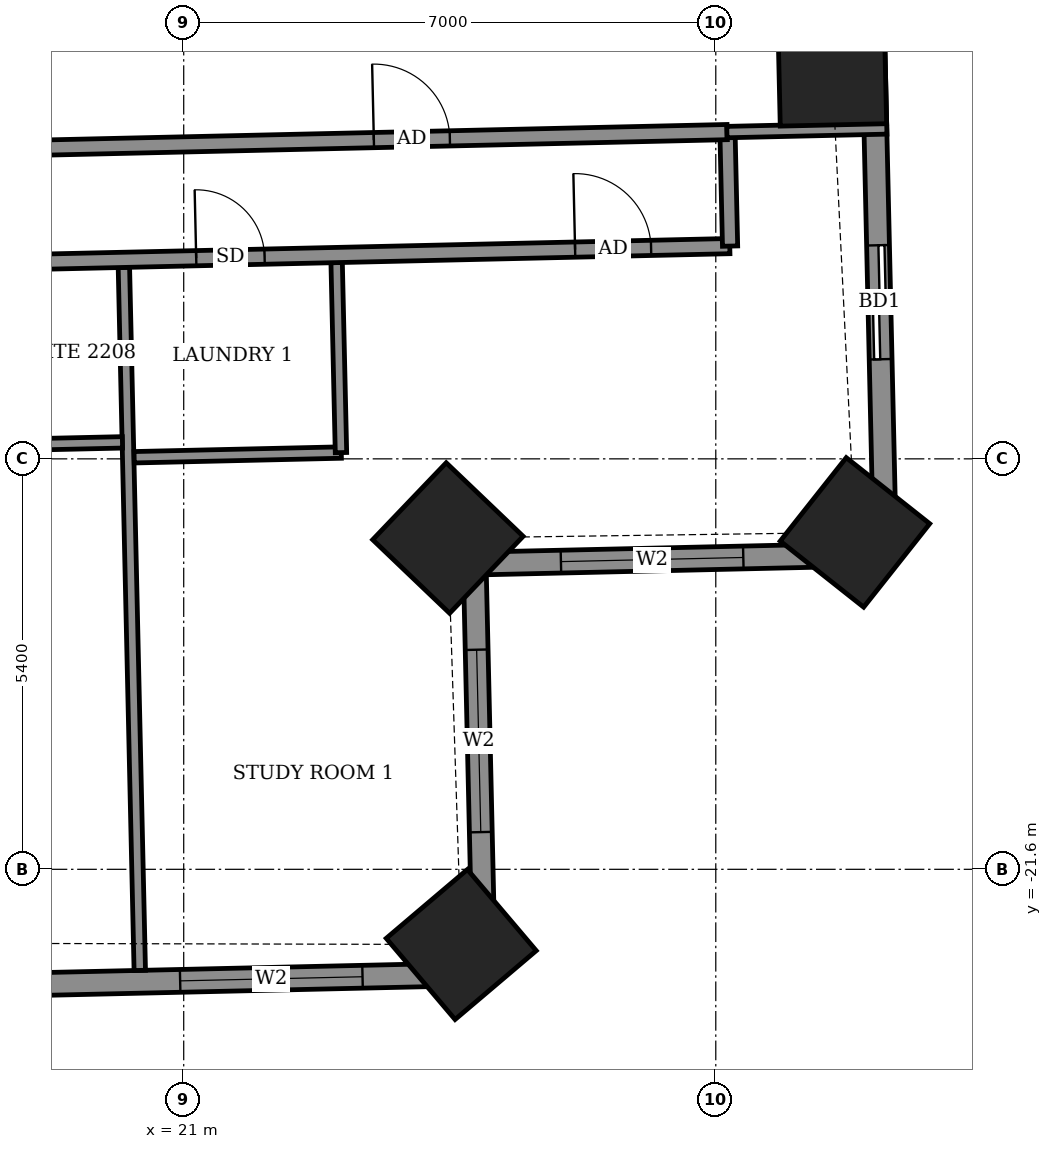
"""IFC4 building model, lengths in metres.
Left out: names, types, materials, properties, quantities, classifications, styles, units other than length and angle.
Written with IfcOpenShell. Run it as: python <this file> out.ifc"""

import sys

from ifc_helpers import new_model, si_unit, direction, frame, frame_2d, origin, origin_2d, place, context, subcontext, project, spatial, rectangle, extrude, element, fill, save


model = new_model("IFC4")
c1 = context("Model", 3, precision=1e-05, world=origin(), true_north=direction((0.0, 1.0)))
c2 = subcontext(c1, "Body", "Model", "MODEL_VIEW")
j1 = project(units=[si_unit("LENGTHUNIT", "METRE"), si_unit("PLANEANGLEUNIT", "RADIAN")], contexts=[c1])
p1 = place(None, origin())
s1 = spatial("IfcSite", under=j1, at=p1, CompositionType="ELEMENT")
p2 = place(p1, origin())
s2 = spatial("IfcBuilding", under=s1, at=p2, CompositionType="ELEMENT")
p3 = place(p2, frame((0.0, 0.0, 90.1)))
s3 = spatial("IfcBuildingStorey", under=s2, at=p3, CompositionType="ELEMENT", Elevation=90.1)
for number, where, z_axis, x_axis in (
    (1, (24.651, -22.589, -0.55), (0.0, 0.0, 1.0), (0.763, 0.647, 0.0)),
    (2, (24.476, -17.241, -0.55), (0.0, 0.0, 1.0), (0.691, 0.723, 0.0)),
    (3, (29.831, -17.168, -0.55), (0.0, 0.0, 1.0), (0.621, 0.784, 0.0)),
    (4, (29.532, -11.107, -0.55), (0.0, 0.0, 1.0), (-0.023, 1.0, 0.0)),
):
    element("IfcColumn", number, at=place(p3, frame(where, z_axis=z_axis, x_axis=x_axis)), inside=s3, PredefinedType="COLUMN", context=c2, shape_type="SweptSolid", body=[
        extrude(rectangle(XDim=1.4, YDim=1.4, at=origin_2d()), origin(), (0.0, 0.0, 1.0), 3.6),
    ])
p4 = place(p3, frame((30.227, -17.455, 0.0), z_axis=(0.0, 0.0, 1.0), x_axis=(-0.022734702163, 0.999741533256, 0.0)))
e5 = element("IfcWall", 5, at=p4, inside=s3, PredefinedType="SOLIDWALL", context=c2, shape_type="SweptSolid", body=[
    extrude(rectangle(XDim=12.929, YDim=0.3, at=frame_2d((6.465, 0.0))), origin(), (0.0, 0.0, 1.0), 3.05),
])
p5 = place(p4, frame((2.566, 0.0, 0.0)))
e6 = element("IfcOpeningElement", 6, at=p5, cuts=e5, PredefinedType="OPENING", context=c2, shape_type="SweptSolid", body=[
    extrude(rectangle(XDim=1.5, YDim=2.4, at=frame_2d((0.75, 1.2))), frame((0.0, 0.16, 0.0), z_axis=(0.0, -1.0, 0.0), x_axis=(1.0, 0.0, 0.0)), (0.0, 0.0, 1.0), 0.32),
])
p6 = place(p4, frame((7.646, 0.0, 0.9)))
e7 = element("IfcOpeningElement", 7, at=p6, cuts=e5, PredefinedType="OPENING", context=c2, shape_type="SweptSolid", body=[
    extrude(rectangle(XDim=1.2, YDim=1.5, at=frame_2d((0.6, 0.75))), frame((0.0, 0.16, 0.0), z_axis=(0.0, -1.0, 0.0), x_axis=(1.0, 0.0, 0.0)), (0.0, 0.0, 1.0), 0.32),
])
p7 = place(p3, frame((-21.409, -24.029, 0.0), z_axis=(0.0, 0.0, 1.0), x_axis=(0.999742634032, 0.022686244721, 0.0)))
e8 = element("IfcWall", 8, at=p7, inside=s3, PredefinedType="SOLIDWALL", context=c2, shape_type="SweptSolid", body=[
    extrude(rectangle(XDim=46.372, YDim=0.3, at=frame_2d((23.186, 0.0))), origin(), (0.0, 0.0, 1.0), 3.05),
])
p8 = place(p7, frame((2.686, 0.0, 0.0)))
e9 = element("IfcOpeningElement", 9, at=p8, cuts=e8, PredefinedType="OPENING", context=c2, shape_type="SweptSolid", body=[
    extrude(rectangle(XDim=1.5, YDim=2.4, at=frame_2d((0.75, 1.2))), frame((0.0, 0.16, 0.0), z_axis=(0.0, -1.0, 0.0), x_axis=(1.0, 0.0, 0.0)), (0.0, 0.0, 1.0), 0.32),
])
p9 = place(p7, frame((7.959, 0.0, 0.0)))
e10 = element("IfcOpeningElement", 10, at=p9, cuts=e8, PredefinedType="OPENING", context=c2, shape_type="SweptSolid", body=[
    extrude(rectangle(XDim=1.5, YDim=2.4, at=frame_2d((0.75, 1.2))), frame((0.0, 0.16, 0.0), z_axis=(0.0, -1.0, 0.0), x_axis=(1.0, 0.0, 0.0)), (0.0, 0.0, 1.0), 0.32),
])
p10 = place(p7, frame((10.842, 0.0, 0.0)))
e11 = element("IfcOpeningElement", 11, at=p10, cuts=e8, PredefinedType="OPENING", context=c2, shape_type="SweptSolid", body=[
    extrude(rectangle(XDim=1.5, YDim=2.4, at=frame_2d((0.75, 1.2))), frame((0.0, 0.16, 0.0), z_axis=(0.0, -1.0, 0.0), x_axis=(1.0, 0.0, 0.0)), (0.0, 0.0, 1.0), 0.32),
])
p11 = place(p7, frame((16.3, 0.0, 0.0)))
e12 = element("IfcOpeningElement", 12, at=p11, cuts=e8, PredefinedType="OPENING", context=c2, shape_type="SweptSolid", body=[
    extrude(rectangle(XDim=1.5, YDim=2.4, at=frame_2d((0.75, 1.2))), frame((0.0, 0.16, 0.0), z_axis=(0.0, -1.0, 0.0), x_axis=(1.0, 0.0, 0.0)), (0.0, 0.0, 1.0), 0.32),
])
p12 = place(p7, frame((21.326, 0.0, 0.0)))
e13 = element("IfcOpeningElement", 13, at=p12, cuts=e8, PredefinedType="OPENING", context=c2, shape_type="SweptSolid", body=[
    extrude(rectangle(XDim=1.5, YDim=2.4, at=frame_2d((0.75, 1.2))), frame((0.0, 0.16, 0.0), z_axis=(0.0, -1.0, 0.0), x_axis=(1.0, 0.0, 0.0)), (0.0, 0.0, 1.0), 0.32),
])
p13 = place(p7, frame((24.21, 0.0, 0.0)))
e14 = element("IfcOpeningElement", 14, at=p13, cuts=e8, PredefinedType="OPENING", context=c2, shape_type="SweptSolid", body=[
    extrude(rectangle(XDim=1.5, YDim=2.4, at=frame_2d((0.75, 1.2))), frame((0.0, 0.16, 0.0), z_axis=(0.0, -1.0, 0.0), x_axis=(1.0, 0.0, 0.0)), (0.0, 0.0, 1.0), 0.32),
])
p14 = place(p7, frame((29.769, 0.0, 0.0)))
e15 = element("IfcOpeningElement", 15, at=p14, cuts=e8, PredefinedType="OPENING", context=c2, shape_type="SweptSolid", body=[
    extrude(rectangle(XDim=1.5, YDim=2.4, at=frame_2d((0.75, 1.2))), frame((0.0, 0.16, 0.0), z_axis=(0.0, -1.0, 0.0), x_axis=(1.0, 0.0, 0.0)), (0.0, 0.0, 1.0), 0.32),
])
p15 = place(p7, frame((34.819, 0.0, 0.0)))
e16 = element("IfcOpeningElement", 16, at=p15, cuts=e8, PredefinedType="OPENING", context=c2, shape_type="SweptSolid", body=[
    extrude(rectangle(XDim=1.5, YDim=2.4, at=frame_2d((0.75, 1.2))), frame((0.0, 0.16, 0.0), z_axis=(0.0, -1.0, 0.0), x_axis=(1.0, 0.0, 0.0)), (0.0, 0.0, 1.0), 0.32),
])
p16 = place(p7, frame((37.852, 0.0, 0.0)))
e17 = element("IfcOpeningElement", 17, at=p16, cuts=e8, PredefinedType="OPENING", context=c2, shape_type="SweptSolid", body=[
    extrude(rectangle(XDim=1.2, YDim=2.4, at=frame_2d((0.6, 1.2))), frame((0.0, 0.16, 0.0), z_axis=(0.0, -1.0, 0.0), x_axis=(1.0, 0.0, 0.0)), (0.0, 0.0, 1.0), 0.32),
])
p17 = place(p7, frame((42.373, 0.0, 0.9)))
e18 = element("IfcOpeningElement", 18, at=p17, cuts=e8, PredefinedType="OPENING", context=c2, shape_type="SweptSolid", body=[
    extrude(rectangle(XDim=2.4, YDim=1.5, at=frame_2d((1.2, 0.75))), frame((0.0, 0.16, 0.0), z_axis=(0.0, -1.0, 0.0), x_axis=(1.0, 0.0, 0.0)), (0.0, 0.0, 1.0), 0.32),
])
p18 = place(p3, frame((24.951, -22.977, 0.0), z_axis=(0.0, 0.0, 1.0), x_axis=(-0.022784045517, 0.999740409941, 0.0)))
e19 = element("IfcWall", 19, at=p18, inside=s3, PredefinedType="SOLIDWALL", context=c2, shape_type="SweptSolid", body=[
    extrude(rectangle(XDim=5.401, YDim=0.3, at=frame_2d((2.7, 0.0))), origin(), (0.0, 0.0, 1.0), 2.55),
])
p19 = place(p18, frame((1.867, 0.0, 0.9)))
e20 = element("IfcOpeningElement", 20, at=p19, cuts=e19, PredefinedType="OPENING", context=c2, shape_type="SweptSolid", body=[
    extrude(rectangle(XDim=2.4, YDim=1.5, at=frame_2d((1.2, 0.75))), frame((0.0, 0.16, 0.0), z_axis=(0.0, -1.0, 0.0), x_axis=(1.0, 0.0, 0.0)), (0.0, 0.0, 1.0), 0.32),
])
p20 = place(p3, frame((24.828, -17.578, 0.0), z_axis=(0.0, 0.0, 1.0), x_axis=(0.99974143864, 0.022738862475, 0.0)))
e21 = element("IfcWall", 21, at=p20, inside=s3, PredefinedType="SOLIDWALL", context=c2, shape_type="SweptSolid", body=[
    extrude(rectangle(XDim=5.401, YDim=0.3, at=frame_2d((2.7, 0.0))), origin(), (0.0, 0.0, 1.0), 2.55),
])
p21 = place(p20, frame((1.135, 0.0, 0.9)))
e22 = element("IfcOpeningElement", 22, at=p21, cuts=e21, PredefinedType="OPENING", context=c2, shape_type="SweptSolid", body=[
    extrude(rectangle(XDim=2.4, YDim=1.5, at=frame_2d((1.2, 0.75))), frame((0.0, 0.16, 0.0), z_axis=(0.0, -1.0, 0.0), x_axis=(1.0, 0.0, 0.0)), (0.0, 0.0, 1.0), 0.32),
])
p22 = place(p3, frame((20.422, -22.93, 0.0), z_axis=(0.0, 0.0, 1.0), x_axis=(-0.022618288198, 0.999744173796, 0.0)))
e23 = element("IfcWall", 23, at=p22, inside=s3, PredefinedType="PARTITIONING", context=c2, shape_type="SweptSolid", body=[
    extrude(rectangle(XDim=9.25, YDim=0.15, at=frame_2d((4.625, 0.0))), origin(), (0.0, 0.0, 1.0), 2.55),
])
p23 = place(p3, frame((20.348, -16.179, 0.0), z_axis=(0.0, 0.0, 1.0), x_axis=(0.999741187782, 0.022749889061, 0.0)))
e24 = element("IfcWall", 24, at=p23, inside=s3, PredefinedType="PARTITIONING", context=c2, shape_type="SweptSolid", body=[
    extrude(rectangle(XDim=2.726, YDim=0.15, at=frame_2d((1.363, 0.0))), origin(), (0.0, 0.0, 1.0), 3.05),
])
p24 = place(p3, frame((23.069, -16.118, 0.0), z_axis=(0.0, 0.0, 1.0), x_axis=(-0.022845598362, 0.999739005259, 0.0)))
e25 = element("IfcWall", 25, at=p24, inside=s3, PredefinedType="PARTITIONING", context=c2, shape_type="SweptSolid", body=[
    extrude(rectangle(XDim=2.501, YDim=0.15, at=frame_2d((1.25, 0.0))), origin(), (0.0, 0.0, 1.0), 3.05),
])
p25 = place(p3, frame((17.869, -16.035, 0.0), z_axis=(0.0, 0.0, 1.0), x_axis=(0.999750007167, 0.022358961731, 0.0)))
e26 = element("IfcWall", 26, at=p25, inside=s3, PredefinedType="PARTITIONING", context=c2, shape_type="SweptSolid", body=[
    extrude(rectangle(XDim=2.326, YDim=0.15, at=frame_2d((1.163, 0.0))), origin(), (0.0, 0.0, 1.0), 3.05),
])
p26 = place(p3, frame((-24.274, -14.591, 0.0), z_axis=(0.0, 0.0, 1.0), x_axis=(0.999742718753, 0.022682510909, 0.0)))
e27 = element("IfcWall", 27, at=p26, inside=s3, PredefinedType="PARTITIONING", context=c2, shape_type="SweptSolid", body=[
    extrude(rectangle(XDim=52.471, YDim=0.2, at=frame_2d((26.236, 0.0))), origin(), (0.0, 0.0, 1.0), 3.05),
])
p27 = place(p26, frame((1.525, 0.0, 0.0)))
e28 = element("IfcOpeningElement", 28, at=p27, cuts=e27, PredefinedType="OPENING", context=c2, shape_type="SweptSolid", body=[
    extrude(rectangle(XDim=1.0, YDim=2.1, at=frame_2d((0.5, 1.05))), frame((0.0, 0.11, 0.0), z_axis=(0.0, -1.0, 0.0), x_axis=(1.0, 0.0, 0.0)), (0.0, 0.0, 1.0), 0.22),
])
p28 = place(p26, frame((6.9, 0.0, 0.0)))
e29 = element("IfcOpeningElement", 29, at=p28, cuts=e27, PredefinedType="OPENING", context=c2, shape_type="SweptSolid", body=[
    extrude(rectangle(XDim=0.9, YDim=2.1, at=frame_2d((0.45, 1.05))), frame((0.0, 0.11, 0.0), z_axis=(0.0, -1.0, 0.0), x_axis=(1.0, 0.0, 0.0)), (0.0, 0.0, 1.0), 0.22),
])
p29 = place(p26, frame((11.575, 0.0, 0.0)))
e30 = element("IfcOpeningElement", 30, at=p29, cuts=e27, PredefinedType="OPENING", context=c2, shape_type="SweptSolid", body=[
    extrude(rectangle(XDim=0.9, YDim=2.1, at=frame_2d((0.45, 1.05))), frame((0.0, 0.11, 0.0), z_axis=(0.0, -1.0, 0.0), x_axis=(1.0, 0.0, 0.0)), (0.0, 0.0, 1.0), 0.22),
])
p30 = place(p26, frame((13.6, 0.0, 0.0)))
e31 = element("IfcOpeningElement", 31, at=p30, cuts=e27, PredefinedType="OPENING", context=c2, shape_type="SweptSolid", body=[
    extrude(rectangle(XDim=0.9, YDim=2.1, at=frame_2d((0.45, 1.05))), frame((0.0, 0.11, 0.0), z_axis=(0.0, -1.0, 0.0), x_axis=(1.0, 0.0, 0.0)), (0.0, 0.0, 1.0), 0.22),
])
p31 = place(p26, frame((20.45, 0.0, 0.0)))
e32 = element("IfcOpeningElement", 32, at=p31, cuts=e27, PredefinedType="OPENING", context=c2, shape_type="SweptSolid", body=[
    extrude(rectangle(XDim=0.9, YDim=2.1, at=frame_2d((0.45, 1.05))), frame((0.0, 0.11, 0.0), z_axis=(0.0, -1.0, 0.0), x_axis=(1.0, 0.0, 0.0)), (0.0, 0.0, 1.0), 0.22),
])
p32 = place(p26, frame((22.6, 0.0, 0.0)))
e33 = element("IfcOpeningElement", 33, at=p32, cuts=e27, PredefinedType="OPENING", context=c2, shape_type="SweptSolid", body=[
    extrude(rectangle(XDim=0.9, YDim=2.1, at=frame_2d((0.45, 1.05))), frame((0.0, 0.11, 0.0), z_axis=(0.0, -1.0, 0.0), x_axis=(1.0, 0.0, 0.0)), (0.0, 0.0, 1.0), 0.22),
])
p33 = place(p26, frame((29.475, 0.0, 0.0)))
e34 = element("IfcOpeningElement", 34, at=p33, cuts=e27, PredefinedType="OPENING", context=c2, shape_type="SweptSolid", body=[
    extrude(rectangle(XDim=0.9, YDim=2.1, at=frame_2d((0.45, 1.05))), frame((0.0, 0.11, 0.0), z_axis=(0.0, -1.0, 0.0), x_axis=(1.0, 0.0, 0.0)), (0.0, 0.0, 1.0), 0.22),
])
p34 = place(p26, frame((31.675, 0.0, 0.0)))
e35 = element("IfcOpeningElement", 35, at=p34, cuts=e27, PredefinedType="OPENING", context=c2, shape_type="SweptSolid", body=[
    extrude(rectangle(XDim=0.9, YDim=2.1, at=frame_2d((0.45, 1.05))), frame((0.0, 0.11, 0.0), z_axis=(0.0, -1.0, 0.0), x_axis=(1.0, 0.0, 0.0)), (0.0, 0.0, 1.0), 0.22),
])
p35 = place(p26, frame((38.675, 0.0, 0.0)))
e36 = element("IfcOpeningElement", 36, at=p35, cuts=e27, PredefinedType="OPENING", context=c2, shape_type="SweptSolid", body=[
    extrude(rectangle(XDim=0.9, YDim=2.1, at=frame_2d((0.45, 1.05))), frame((0.0, 0.11, 0.0), z_axis=(0.0, -1.0, 0.0), x_axis=(1.0, 0.0, 0.0)), (0.0, 0.0, 1.0), 0.22),
])
p36 = place(p26, frame((40.675, 0.0, 0.0)))
e37 = element("IfcOpeningElement", 37, at=p36, cuts=e27, PredefinedType="OPENING", context=c2, shape_type="SweptSolid", body=[
    extrude(rectangle(XDim=0.9, YDim=2.1, at=frame_2d((0.45, 1.05))), frame((0.0, 0.11, 0.0), z_axis=(0.0, -1.0, 0.0), x_axis=(1.0, 0.0, 0.0)), (0.0, 0.0, 1.0), 0.22),
])
p37 = place(p26, frame((50.436, 0.0, 0.0)))
e38 = element("IfcOpeningElement", 38, at=p37, cuts=e27, PredefinedType="OPENING", context=c2, shape_type="SweptSolid", body=[
    extrude(rectangle(XDim=1.0, YDim=2.1, at=frame_2d((0.5, 1.05))), frame((0.0, 0.11, 0.0), z_axis=(0.0, -1.0, 0.0), x_axis=(1.0, 0.0, 0.0)), (0.0, 0.0, 1.0), 0.22),
])
p38 = place(p26, frame((45.45, 0.0, 0.0)))
e39 = element("IfcOpeningElement", 39, at=p38, cuts=e27, PredefinedType="OPENING", context=c2, shape_type="SweptSolid", body=[
    extrude(rectangle(XDim=0.9, YDim=2.1, at=frame_2d((0.45, 1.05))), frame((0.0, 0.11, 0.0), z_axis=(0.0, -1.0, 0.0), x_axis=(1.0, 0.0, 0.0)), (0.0, 0.0, 1.0), 0.22),
])
p39 = place(p3, frame((28.188, -13.401, 0.0), z_axis=(0.0, 0.0, 1.0), x_axis=(-0.022617910375, 0.999744182344, 0.0)))
e40 = element("IfcWall", 40, at=p39, inside=s3, PredefinedType="PARTITIONING", context=c2, shape_type="SweptSolid", body=[
    extrude(rectangle(XDim=1.5, YDim=0.2, at=frame_2d((0.75, 0.0))), origin(), (0.0, 0.0, 1.0), 3.05),
])
p40 = place(p3, frame((17.753, -12.137, 0.0), z_axis=(0.0, 0.0, 1.0), x_axis=(0.999742295888, 0.022701141223, 0.0)))
e41 = element("IfcWall", 41, at=p40, inside=s3, PredefinedType="PARTITIONING", context=c2, shape_type="SweptSolid", body=[
    extrude(rectangle(XDim=10.4, YDim=0.2, at=frame_2d((5.2, 0.0))), origin(), (0.0, 0.0, 1.0), 3.05),
])
p41 = place(p40, frame((5.75, 0.0, 0.0)))
e42 = element("IfcOpeningElement", 42, at=p41, cuts=e41, PredefinedType="OPENING", context=c2, shape_type="SweptSolid", body=[
    extrude(rectangle(XDim=1.0, YDim=2.1, at=frame_2d((0.5, 1.05))), frame((0.0, 0.11, 0.0), z_axis=(0.0, -1.0, 0.0), x_axis=(1.0, 0.0, 0.0)), (0.0, 0.0, 1.0), 0.22),
])
p42 = place(p3, frame((28.146, -11.901, 0.0), z_axis=(0.0, 0.0, 1.0), x_axis=(0.999741476082, 0.022737216212, 0.0)))
e43 = element("IfcWall", 43, at=p42, inside=s3, PredefinedType="PARTITIONING", context=c2, shape_type="SweptSolid", body=[
    extrude(rectangle(XDim=2.104, YDim=0.15, at=frame_2d((1.052, 0.0))), origin(), (0.0, 0.0, 1.0), 2.55),
])
p43 = place(p5, origin())
e44 = element("IfcDoor", 44, at=p43, inside=s3, OperationType="SLIDING_TO_LEFT", PredefinedType="DOOR", context=c2, shape_type="SweptSolid", body=[
    extrude(rectangle(XDim=1.5, YDim=2.4, at=frame_2d((0.75, 1.2))), frame((0.0, 0.025, 0.0), z_axis=(0.0, -1.0, 0.0), x_axis=(1.0, 0.0, 0.0)), (0.0, 0.0, 1.0), 0.05),
])
fill(e6, e44)
p44 = place(p17, origin())
e45 = element("IfcWindow", 45, at=p44, inside=s3, PartitioningType="DOUBLE_PANEL_VERTICAL", PredefinedType="WINDOW", context=c2, shape_type="SweptSolid", body=[
    extrude(rectangle(XDim=2.4, YDim=1.5, at=frame_2d((1.2, 0.75))), frame((0.0, 0.03, 0.0), z_axis=(0.0, -1.0, 0.0), x_axis=(1.0, 0.0, 0.0)), (0.0, 0.0, 1.0), 0.06),
])
fill(e18, e45)
p45 = place(p19, origin())
e46 = element("IfcWindow", 46, at=p45, inside=s3, PartitioningType="DOUBLE_PANEL_VERTICAL", PredefinedType="WINDOW", context=c2, shape_type="SweptSolid", body=[
    extrude(rectangle(XDim=2.4, YDim=1.5, at=frame_2d((1.2, 0.75))), frame((0.0, 0.03, 0.0), z_axis=(0.0, -1.0, 0.0), x_axis=(1.0, 0.0, 0.0)), (0.0, 0.0, 1.0), 0.06),
])
fill(e20, e46)
p46 = place(p21, origin())
e47 = element("IfcWindow", 47, at=p46, inside=s3, PartitioningType="DOUBLE_PANEL_VERTICAL", PredefinedType="WINDOW", context=c2, shape_type="SweptSolid", body=[
    extrude(rectangle(XDim=2.4, YDim=1.5, at=frame_2d((1.2, 0.75))), frame((0.0, 0.03, 0.0), z_axis=(0.0, -1.0, 0.0), x_axis=(1.0, 0.0, 0.0)), (0.0, 0.0, 1.0), 0.06),
])
fill(e22, e47)
p47 = place(p37, origin())
e48 = element("IfcDoor", 48, at=p47, inside=s3, OperationType="SINGLE_SWING_RIGHT", PredefinedType="DOOR", context=c2, shape_type="SweptSolid", body=[
    extrude(rectangle(XDim=1.0, YDim=2.1, at=frame_2d((0.5, 1.05))), frame((0.0, 0.025, 0.0), z_axis=(0.0, -1.0, 0.0), x_axis=(1.0, 0.0, 0.0)), (0.0, 0.0, 1.0), 0.05),
])
fill(e38, e48)
p48 = place(p38, origin())
e49 = element("IfcDoor", 49, at=p48, inside=s3, OperationType="SINGLE_SWING_RIGHT", PredefinedType="DOOR", context=c2, shape_type="SweptSolid", body=[
    extrude(rectangle(XDim=0.9, YDim=2.1, at=frame_2d((0.45, 1.05))), frame((0.0, 0.025, 0.0), z_axis=(0.0, -1.0, 0.0), x_axis=(1.0, 0.0, 0.0)), (0.0, 0.0, 1.0), 0.05),
])
fill(e39, e49)
p49 = place(p41, origin())
e50 = element("IfcDoor", 50, at=p49, inside=s3, OperationType="SINGLE_SWING_LEFT", PredefinedType="DOOR", context=c2, shape_type="SweptSolid", body=[
    extrude(rectangle(XDim=1.0, YDim=2.1, at=frame_2d((0.5, 1.05))), frame((0.0, 0.025, 0.0), z_axis=(0.0, -1.0, 0.0), x_axis=(1.0, 0.0, 0.0)), (0.0, 0.0, 1.0), 0.05),
])
fill(e42, e50)
save(model, sys.argv[1])
